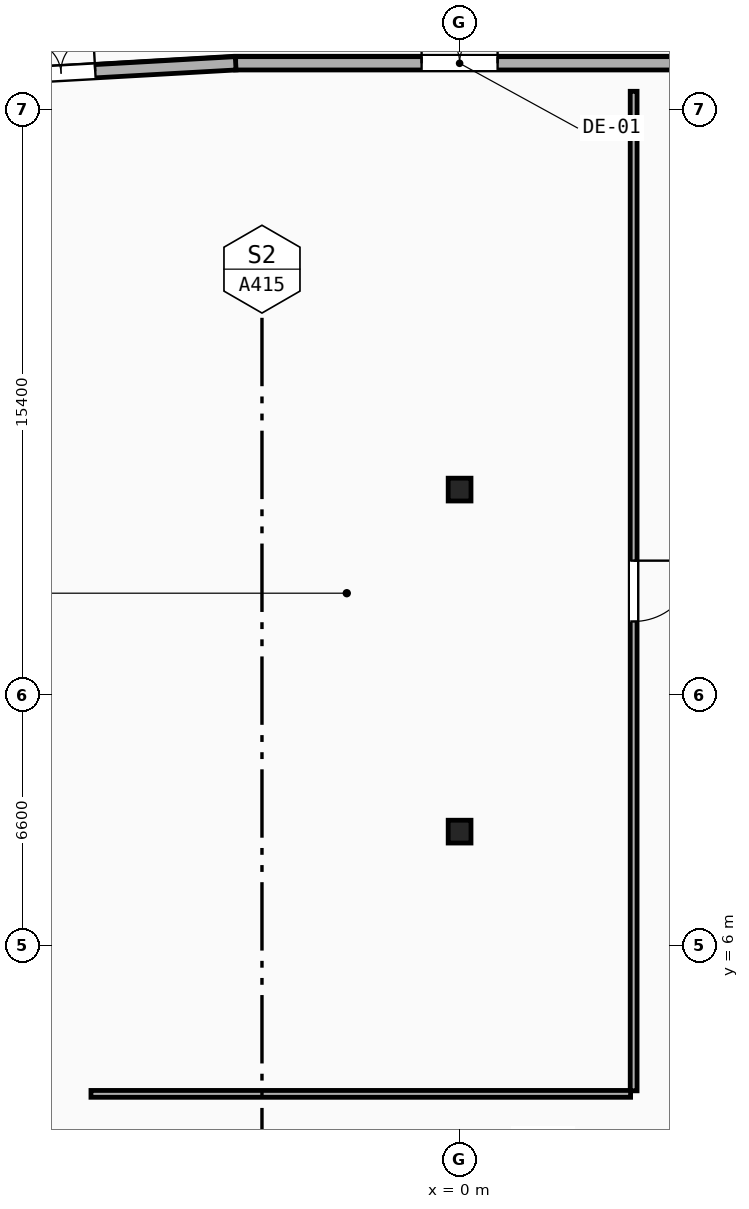
"""IFC4 building model, lengths in metres.
Left out: names, types, materials, properties, quantities, classifications, styles, units other than length and angle.
Written with IfcOpenShell. Run it as: python <this file> out.ifc"""

import sys

from ifc_helpers import new_model, si_unit, direction, frame, frame_2d, origin, origin_2d, place, context, subcontext, project, spatial, rectangle, hollow_rectangle, extrude, element, fill, save


model = new_model("IFC4")
c1 = context("Model", 3, precision=1e-05, world=origin(), true_north=direction((0.0, 1.0)))
c2 = subcontext(c1, "Body", "Model", "MODEL_VIEW")
j1 = project(units=[si_unit("LENGTHUNIT", "METRE"), si_unit("PLANEANGLEUNIT", "RADIAN")], contexts=[c1])
p1 = place(None, origin())
s1 = spatial("IfcSite", under=j1, at=p1, CompositionType="ELEMENT")
p2 = place(p1, origin())
s2 = spatial("IfcBuilding", under=s1, at=p2, CompositionType="ELEMENT")
p3 = place(p2, origin())
s3 = spatial("IfcBuildingStorey", under=s2, at=p3, CompositionType="ELEMENT", Elevation=0.0)
for number, where, z_axis, x_axis in (
    (1, (0.0, 9.0, 0.0), (0.0, 0.0, 1.0), (1.0, 0.0, 0.0)),
    (2, (0.0, 18.0, 0.0), (0.0, 0.0, 1.0), (1.0, 0.0, 0.0)),
):
    element("IfcColumn", number, at=place(p3, frame(where, z_axis=z_axis, x_axis=x_axis)), inside=s3, PredefinedType="COLUMN", context=c2, shape_type="SweptSolid", body=[
        extrude(hollow_rectangle(XDim=0.6, YDim=0.6, WallThickness=0.032, at=origin_2d()), origin(), (0.0, 0.0, 1.0), 6.0),
    ])
p4 = place(p3, frame((-5.893, 29.216, 0.0), z_axis=(0.0, 0.0, 1.0), x_axis=(1.0, 0.0, 0.0)))
e3 = element("IfcWall", 3, at=p4, inside=s3, PredefinedType="SOLIDWALL", context=c2, shape_type="SweptSolid", body=[
    extrude(rectangle(XDim=11.785, YDim=0.35, at=frame_2d((5.893, 0.0))), origin(), (0.0, 0.0, 1.0), 5.65),
])
p5 = place(p4, frame((4.893, 0.0, 0.0)))
e4 = element("IfcOpeningElement", 4, at=p5, cuts=e3, PredefinedType="OPENING", context=c2, shape_type="SweptSolid", body=[
    extrude(rectangle(XDim=2.0, YDim=2.4, at=frame_2d((1.0, 1.2))), frame((0.0, 0.185, 0.0), z_axis=(0.0, -1.0, 0.0), x_axis=(1.0, 0.0, 0.0)), (0.0, 0.0, 1.0), 0.37),
])
p6 = place(p3, frame((-15.079, 28.698, 0.0), z_axis=(0.0, 0.0, 1.0), x_axis=(0.998413463137, 0.056307695976, 0.0)))
e5 = element("IfcWall", 5, at=p6, inside=s3, PredefinedType="SOLIDWALL", context=c2, shape_type="SweptSolid", body=[
    extrude(rectangle(XDim=9.201, YDim=0.35, at=frame_2d((4.6, 0.0))), origin(), (0.0, 0.0, 1.0), 5.65),
])
p7 = place(p6, frame((3.7, 0.0, 0.0)))
e6 = element("IfcOpeningElement", 6, at=p7, cuts=e5, PredefinedType="OPENING", context=c2, shape_type="SweptSolid", body=[
    extrude(rectangle(XDim=1.8, YDim=2.3, at=frame_2d((0.9, 1.15))), frame((0.0, 0.185, 0.0), z_axis=(0.0, -1.0, 0.0), x_axis=(1.0, 0.0, 0.0)), (0.0, 0.0, 1.0), 0.37),
])
p8 = place(p3, frame((4.58, 28.48, 0.0), z_axis=(0.0, 0.0, 1.0), x_axis=(0.0, -1.0, 0.0)))
e7 = element("IfcWall", 7, at=p8, inside=s3, PredefinedType="PARTITIONING", context=c2, shape_type="SweptSolid", body=[
    extrude(rectangle(XDim=26.3, YDim=0.18, at=frame_2d((13.15, 0.0))), origin(), (0.0, 0.0, 1.0), 5.65),
])
p9 = place(p8, frame((12.35, 0.0, 0.0)))
e8 = element("IfcOpeningElement", 8, at=p9, cuts=e7, PredefinedType="OPENING", context=c2, shape_type="SweptSolid", body=[
    extrude(rectangle(XDim=1.6, YDim=2.2, at=frame_2d((0.8, 1.1))), frame((0.0, 0.1, 0.0), z_axis=(0.0, -1.0, 0.0), x_axis=(1.0, 0.0, 0.0)), (0.0, 0.0, 1.0), 0.2),
])
p10 = place(p3, frame((4.5, 2.1, 0.0), z_axis=(0.0, 0.0, 1.0), x_axis=(-1.0, 0.0, 0.0)))
e9 = element("IfcWall", 9, at=p10, inside=s3, PredefinedType="PARTITIONING", context=c2, shape_type="SweptSolid", body=[
    extrude(rectangle(XDim=14.2, YDim=0.18, at=frame_2d((7.1, 0.0))), origin(), (0.0, 0.0, 1.0), 4.877),
])
p11 = place(p5, origin())
e10 = element("IfcDoor", 10, at=p11, inside=s3, OperationType="DOUBLE_DOOR_SINGLE_SWING", PredefinedType="DOOR", context=c2, shape_type="SweptSolid", body=[
    extrude(rectangle(XDim=2.0, YDim=2.4, at=frame_2d((1.0, 1.2))), frame((0.0, 0.025, 0.0), z_axis=(0.0, -1.0, 0.0), x_axis=(1.0, 0.0, 0.0)), (0.0, 0.0, 1.0), 0.05),
])
fill(e4, e10)
p12 = place(p7, origin())
e11 = element("IfcDoor", 11, at=p12, inside=s3, OperationType="DOUBLE_DOOR_SINGLE_SWING", PredefinedType="DOOR", context=c2, shape_type="SweptSolid", body=[
    extrude(rectangle(XDim=1.8, YDim=2.3, at=frame_2d((0.9, 1.15))), frame((0.0, 0.025, 0.0), z_axis=(0.0, -1.0, 0.0), x_axis=(1.0, 0.0, 0.0)), (0.0, 0.0, 1.0), 0.05),
])
fill(e6, e11)
p13 = place(p9, origin())
e12 = element("IfcDoor", 12, at=p13, inside=s3, OperationType="SINGLE_SWING_LEFT", PredefinedType="DOOR", context=c2, shape_type="SweptSolid", body=[
    extrude(rectangle(XDim=1.6, YDim=2.2, at=frame_2d((0.8, 1.1))), frame((0.0, 0.025, 0.0), z_axis=(0.0, -1.0, 0.0), x_axis=(1.0, 0.0, 0.0)), (0.0, 0.0, 1.0), 0.05),
])
fill(e8, e12)
save(model, sys.argv[1])
